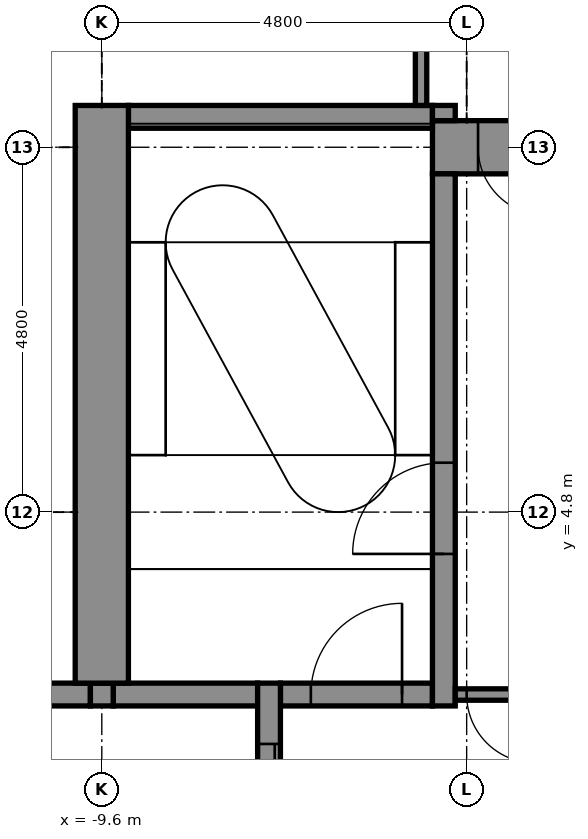
"""IFC4 building model, lengths in metres.
Left out: names, types, materials, properties, quantities, classifications, styles, units other than length and angle.
Written with IfcOpenShell. Run it as: python <this file> out.ifc"""

import sys

from ifc_helpers import new_model, si_unit, direction, frame, frame_2d, origin, place, context, subcontext, project, spatial, rectangle, extrude, element, fill, save


model = new_model("IFC4")
c1 = context("Model", 3, precision=1e-05, world=origin(), true_north=direction((0.0, 1.0)))
c2 = subcontext(c1, "Body", "Model", "MODEL_VIEW")
j1 = project(units=[si_unit("LENGTHUNIT", "METRE"), si_unit("PLANEANGLEUNIT", "RADIAN")], contexts=[c1])
p1 = place(None, origin())
s1 = spatial("IfcSite", under=j1, at=p1, CompositionType="ELEMENT")
p2 = place(p1, origin())
s2 = spatial("IfcBuilding", under=s1, at=p2, CompositionType="ELEMENT")
p3 = place(p2, frame((0.0, 0.0, 170.0)))
s3 = spatial("IfcBuildingStorey", under=s2, at=p3, CompositionType="ELEMENT", Elevation=170.0)
p4 = place(p3, frame((-10.85, 2.4, -0.15), z_axis=(0.0, 0.0, 1.0), x_axis=(1.0, 0.0, 0.0)))
e1 = element("IfcWall", 1, at=p4, inside=s3, PredefinedType="STANDARD", context=c2, shape_type="SweptSolid", body=[
    extrude(rectangle(XDim=1.1, YDim=0.3, at=frame_2d((0.55, 0.0))), origin(), (0.0, 0.0, 1.0), 3.9),
])
p5 = place(p3, frame((-9.45, 2.4, -0.15), z_axis=(0.0, 0.0, 1.0), x_axis=(1.0, 0.0, 0.0)))
e2 = element("IfcWall", 2, at=p5, inside=s3, PredefinedType="STANDARD", context=c2, shape_type="SweptSolid", body=[
    extrude(rectangle(XDim=1.9, YDim=0.3, at=frame_2d((0.95, 0.0))), origin(), (0.0, 0.0, 1.0), 3.9),
])
p6 = place(p3, frame((-7.25, 2.4, -0.15), z_axis=(0.0, 0.0, 1.0), x_axis=(1.0, 0.0, 0.0)))
e3 = element("IfcWall", 3, at=p6, inside=s3, PredefinedType="STANDARD", context=c2, shape_type="SweptSolid", body=[
    extrude(rectangle(XDim=2.0, YDim=0.3, at=frame_2d((1.0, 0.0))), origin(), (0.0, 0.0, 1.0), 3.9),
])
p7 = place(p6, frame((0.4, 0.0, 0.15)))
e4 = element("IfcOpeningElement", 4, at=p7, cuts=e3, PredefinedType="OPENING", context=c2, shape_type="SweptSolid", body=[
    extrude(rectangle(XDim=1.2, YDim=2.1, at=frame_2d((0.6, 1.05))), frame((0.0, 0.16, 0.0), z_axis=(0.0, -1.0, 0.0), x_axis=(1.0, 0.0, 0.0)), (0.0, 0.0, 1.0), 0.32),
])
p8 = place(p3, frame((-5.25, 9.6, -0.15), z_axis=(0.0, 0.0, 1.0), x_axis=(1.0, 0.0, 0.0)))
e5 = element("IfcWall", 5, at=p8, inside=s3, PredefinedType="SHEAR", context=c2, shape_type="SweptSolid", body=[
    extrude(rectangle(XDim=14.5, YDim=0.7, at=frame_2d((7.25, 0.0))), origin(), (0.0, 0.0, 1.0), 3.9),
])
p9 = place(p8, frame((0.6, 0.0, 0.15)))
e6 = element("IfcOpeningElement", 6, at=p9, cuts=e5, PredefinedType="OPENING", context=c2, shape_type="SweptSolid", body=[
    extrude(rectangle(XDim=0.9, YDim=2.1, at=frame_2d((0.45, 1.05))), frame((0.0, 0.36, 0.0), z_axis=(0.0, -1.0, 0.0), x_axis=(1.0, 0.0, 0.0)), (0.0, 0.0, 1.0), 0.72),
])
p10 = place(p3, frame((-9.25, 10.0, -0.15), z_axis=(0.0, 0.0, 1.0), x_axis=(1.0, 0.0, 0.0)))
e7 = element("IfcWall", 7, at=p10, inside=s3, PredefinedType="STANDARD", context=c2, shape_type="SweptSolid", body=[
    extrude(rectangle(XDim=4.0, YDim=0.3, at=frame_2d((2.0, 0.0))), origin(), (0.0, 0.0, 1.0), 3.9),
])
p11 = place(p3, frame((-9.6, 2.25, -0.15), z_axis=(0.0, 0.0, 1.0), x_axis=(0.0, 1.0, 0.0)))
e8 = element("IfcWall", 8, at=p11, inside=s3, PredefinedType="STANDARD", context=c2, shape_type="SweptSolid", body=[
    extrude(rectangle(XDim=0.3, YDim=0.3, at=frame_2d((0.15, 0.0))), origin(), (0.0, 0.0, 1.0), 3.9),
])
p12 = place(p3, frame((-9.6, 2.55, -0.15), z_axis=(0.0, 0.0, 1.0), x_axis=(0.0, 1.0, 0.0)))
e9 = element("IfcWall", 9, at=p12, inside=s3, PredefinedType="SHEAR", context=c2, shape_type="SweptSolid", body=[
    extrude(rectangle(XDim=7.6, YDim=0.7, at=frame_2d((3.8, 0.0))), origin(), (0.0, 0.0, 1.0), 3.9),
])
p13 = place(p3, frame((-7.4, -2.55, -0.15), z_axis=(0.0, 0.0, 1.0), x_axis=(0.0, 1.0, 0.0)))
e10 = element("IfcWall", 10, at=p13, inside=s3, PredefinedType="STANDARD", context=c2, shape_type="SweptSolid", body=[
    extrude(rectangle(XDim=5.1, YDim=0.3, at=frame_2d((2.55, 0.0))), origin(), (0.0, 0.0, 1.0), 3.9),
])
p14 = place(p13, frame((0.8, 0.0, 0.15)))
e11 = element("IfcOpeningElement", 11, at=p14, cuts=e10, PredefinedType="OPENING", context=c2, shape_type="SweptSolid", body=[
    extrude(rectangle(XDim=1.1, YDim=2.1, at=frame_2d((0.55, 1.05))), frame((0.0, 0.16, 0.0), z_axis=(0.0, -1.0, 0.0), x_axis=(1.0, 0.0, 0.0)), (0.0, 0.0, 1.0), 0.32),
])
p15 = place(p13, frame((3.2, 0.0, 0.15)))
e12 = element("IfcOpeningElement", 12, at=p15, cuts=e10, PredefinedType="OPENING", context=c2, shape_type="SweptSolid", body=[
    extrude(rectangle(XDim=1.1, YDim=2.1, at=frame_2d((0.55, 1.05))), frame((0.0, 0.16, 0.0), z_axis=(0.0, -1.0, 0.0), x_axis=(1.0, 0.0, 0.0)), (0.0, 0.0, 1.0), 0.32),
])
p16 = place(p3, frame((-5.1, 2.25, -0.15), z_axis=(0.0, 0.0, 1.0), x_axis=(0.0, 1.0, 0.0)))
e13 = element("IfcWall", 13, at=p16, inside=s3, PredefinedType="STANDARD", context=c2, shape_type="SweptSolid", body=[
    extrude(rectangle(XDim=7.0, YDim=0.3, at=frame_2d((3.5, 0.0))), origin(), (0.0, 0.0, 1.0), 3.9),
])
p17 = place(p16, frame((2.0, 0.0, 0.15)))
e14 = element("IfcOpeningElement", 14, at=p17, cuts=e13, PredefinedType="OPENING", context=c2, shape_type="SweptSolid", body=[
    extrude(rectangle(XDim=1.2, YDim=2.1, at=frame_2d((0.6, 1.05))), frame((0.0, 0.16, 0.0), z_axis=(0.0, -1.0, 0.0), x_axis=(1.0, 0.0, 0.0)), (0.0, 0.0, 1.0), 0.32),
])
p18 = place(p3, frame((-5.1, 9.95, -0.15), z_axis=(0.0, 0.0, 1.0), x_axis=(0.0, 1.0, 0.0)))
e15 = element("IfcWall", 15, at=p18, inside=s3, PredefinedType="STANDARD", context=c2, shape_type="SweptSolid", body=[
    extrude(rectangle(XDim=0.2, YDim=0.3, at=frame_2d((0.1, 0.0))), origin(), (0.0, 0.0, 1.0), 3.9),
])
p19 = place(p3, frame((-5.4, 10.15, 0.0), z_axis=(0.0, 0.0, 1.0), x_axis=(0.0, 1.0, 0.0)))
e16 = element("IfcWall", 16, at=p19, inside=s3, PredefinedType="PARTITIONING", context=c2, shape_type="SweptSolid", body=[
    extrude(rectangle(XDim=3.45, YDim=0.15, at=frame_2d((1.725, 0.0))), origin(), (0.0, 0.0, 1.0), 3.75),
])
p20 = place(p3, frame((-4.95, 2.4, 0.0), z_axis=(0.0, 0.0, 1.0), x_axis=(1.0, 0.0, 0.0)))
e17 = element("IfcWall", 17, at=p20, inside=s3, PredefinedType="PARTITIONING", context=c2, shape_type="SweptSolid", body=[
    extrude(rectangle(XDim=1.2, YDim=0.15, at=frame_2d((0.6, 0.0))), origin(), (0.0, 0.0, 1.0), 3.75),
])
p21 = place(p20, frame((0.15, 0.0, 0.0)))
e18 = element("IfcOpeningElement", 18, at=p21, cuts=e17, PredefinedType="OPENING", context=c2, shape_type="SweptSolid", body=[
    extrude(rectangle(XDim=0.9, YDim=2.1, at=frame_2d((0.45, 1.05))), frame((0.0, 0.085, 0.0), z_axis=(0.0, -1.0, 0.0), x_axis=(1.0, 0.0, 0.0)), (0.0, 0.0, 1.0), 0.17),
])
p22 = place(p15, origin())
e19 = element("IfcDoor", 19, at=p22, inside=s3, OperationType="DOUBLE_DOOR_SLIDING", PredefinedType="DOOR", context=c2, shape_type="SweptSolid", body=[
    extrude(rectangle(XDim=1.1, YDim=2.1, at=frame_2d((0.55, 1.05))), frame((0.0, 0.025, 0.0), z_axis=(0.0, -1.0, 0.0), x_axis=(1.0, 0.0, 0.0)), (0.0, 0.0, 1.0), 0.05),
])
fill(e12, e19)
p23 = place(p17, origin())
e20 = element("IfcDoor", 20, at=p23, inside=s3, OperationType="SINGLE_SWING_LEFT", PredefinedType="DOOR", context=c2, shape_type="SweptSolid", body=[
    extrude(rectangle(XDim=1.2, YDim=2.1, at=frame_2d((0.6, 1.05))), frame((0.0, 0.025, 0.0), z_axis=(0.0, -1.0, 0.0), x_axis=(1.0, 0.0, 0.0)), (0.0, 0.0, 1.0), 0.05),
])
fill(e14, e20)
p24 = place(p9, frame((0.9, 0.0, 0.0), z_axis=(0.0, 0.0, 1.0), x_axis=(-1.0, 0.0, 0.0)))
e21 = element("IfcDoor", 21, at=p24, inside=s3, OperationType="SINGLE_SWING_RIGHT", PredefinedType="DOOR", context=c2, shape_type="SweptSolid", body=[
    extrude(rectangle(XDim=0.9, YDim=2.1, at=frame_2d((0.45, 1.05))), frame((0.0, 0.025, 0.0), z_axis=(0.0, -1.0, 0.0), x_axis=(1.0, 0.0, 0.0)), (0.0, 0.0, 1.0), 0.05),
])
fill(e6, e21)
p25 = place(p21, frame((0.9, 0.0, 0.0), z_axis=(0.0, 0.0, 1.0), x_axis=(-1.0, 0.0, 0.0)))
e22 = element("IfcDoor", 22, at=p25, inside=s3, OperationType="SINGLE_SWING_RIGHT", PredefinedType="DOOR", context=c2, shape_type="SweptSolid", body=[
    extrude(rectangle(XDim=0.9, YDim=2.1, at=frame_2d((0.45, 1.05))), frame((0.0, 0.025, 0.0), z_axis=(0.0, -1.0, 0.0), x_axis=(1.0, 0.0, 0.0)), (0.0, 0.0, 1.0), 0.05),
])
fill(e18, e22)
p26 = place(p7, origin())
e23 = element("IfcDoor", 23, at=p26, inside=s3, OperationType="SINGLE_SWING_RIGHT", PredefinedType="DOOR", context=c2, shape_type="SweptSolid", body=[
    extrude(rectangle(XDim=1.2, YDim=2.1, at=frame_2d((0.6, 1.05))), frame((0.0, 0.025, 0.0), z_axis=(0.0, -1.0, 0.0), x_axis=(1.0, 0.0, 0.0)), (0.0, 0.0, 1.0), 0.05),
])
fill(e4, e23)
save(model, sys.argv[1])
